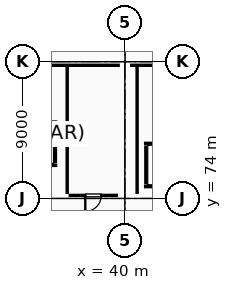
"""IFC4 building model, lengths in metres.
Left out: names, types, materials, properties, quantities, classifications, styles, units other than length and angle.
Written with IfcOpenShell. Run it as: python <this file> out.ifc"""

import sys

from ifc_helpers import new_model, si_unit, direction, frame, frame_2d, origin, origin_2d, place, context, subcontext, project, spatial, rectangle, extrude, element, fill, save


model = new_model("IFC4")
c1 = context("Model", 3, precision=1e-05, world=origin(), true_north=direction((0.0, 1.0)))
c2 = subcontext(c1, "Body", "Model", "MODEL_VIEW")
j1 = project(units=[si_unit("LENGTHUNIT", "METRE"), si_unit("PLANEANGLEUNIT", "RADIAN")], contexts=[c1])
p1 = place(None, origin())
s1 = spatial("IfcSite", under=j1, at=p1, CompositionType="ELEMENT")
p2 = place(p1, origin())
s2 = spatial("IfcBuilding", under=s1, at=p2, CompositionType="ELEMENT")
p3 = place(p2, frame((0.0, 0.0, 5.4)))
s3 = spatial("IfcBuildingStorey", under=s2, at=p3, CompositionType="ELEMENT", Elevation=5.4)
p4 = place(p3, frame((40.0, 74.0, 0.0), z_axis=(0.0, 0.0, 1.0), x_axis=(1.0, 0.0, 0.0)))
e1 = element("IfcColumn", 1, at=p4, inside=s3, PredefinedType="COLUMN", context=c2, shape_type="SweptSolid", body=[
    extrude(rectangle(XDim=0.9, YDim=0.9, at=origin_2d()), origin(), (0.0, 0.0, 1.0), 4.8),
])
p5 = place(p3, frame((40.0, 83.0, 0.0), z_axis=(0.0, 0.0, 1.0), x_axis=(1.0, 0.0, 0.0)))
e2 = element("IfcColumn", 2, at=p5, inside=s3, PredefinedType="COLUMN", context=c2, shape_type="SweptSolid", body=[
    extrude(rectangle(XDim=0.65, YDim=0.65, at=origin_2d()), origin(), (0.0, 0.0, 1.0), 4.8),
])
p6 = place(p3, frame((33.17, 82.76, 0.0), z_axis=(0.0, 0.0, 1.0), x_axis=(1.0, 0.0, 0.0)))
e3 = element("IfcWall", 3, at=p6, inside=s3, PredefinedType="PARAPET", context=c2, shape_type="SweptSolid", body=[
    extrude(rectangle(XDim=6.495, YDim=0.18, at=frame_2d((3.248, 0.0))), origin(), (0.0, 0.0, 1.0), 0.88),
])
p7 = place(p3, frame((40.335, 82.76, 0.0), z_axis=(0.0, 0.0, 1.0), x_axis=(1.0, 0.0, 0.0)))
e4 = element("IfcWall", 4, at=p7, inside=s3, PredefinedType="PARAPET", context=c2, shape_type="SweptSolid", body=[
    extrude(rectangle(XDim=7.33, YDim=0.18, at=frame_2d((3.665, 0.0))), origin(), (0.0, 0.0, 1.0), 0.88),
])
p8 = place(p3, frame((41.25, 74.775, 0.0), z_axis=(0.0, 0.0, 1.0), x_axis=(1.0, 0.0, 0.0)))
e5 = element("IfcWall", 5, at=p8, inside=s3, PredefinedType="STANDARD", context=c2, shape_type="SweptSolid", body=[
    extrude(rectangle(XDim=2.3, YDim=0.25, at=frame_2d((1.15, 0.0))), origin(), (0.0, 0.0, 1.0), 4.53),
])
p9 = place(p8, frame((0.6, 0.0, 0.0)))
e6 = element("IfcOpeningElement", 6, at=p9, cuts=e5, PredefinedType="OPENING", context=c2, shape_type="SweptSolid", body=[
    extrude(rectangle(XDim=1.1, YDim=2.15, at=frame_2d((0.55, 1.075))), frame((0.0, 0.135, 0.0), z_axis=(0.0, -1.0, 0.0), x_axis=(1.0, 0.0, 0.0)), (0.0, 0.0, 1.0), 0.27),
])
p10 = place(p3, frame((43.55, 77.625, 0.0), z_axis=(0.0, 0.0, 1.0), x_axis=(-1.0, 0.0, 0.0)))
e7 = element("IfcWall", 7, at=p10, inside=s3, PredefinedType="STANDARD", context=c2, shape_type="SweptSolid", body=[
    extrude(rectangle(XDim=2.3, YDim=0.25, at=frame_2d((1.15, 0.0))), origin(), (0.0, 0.0, 1.0), 4.53),
])
p11 = place(p3, frame((41.375, 77.49, 0.0), z_axis=(0.0, 0.0, 1.0), x_axis=(0.0, -1.0, 0.0)))
e8 = element("IfcWall", 8, at=p11, inside=s3, PredefinedType="STANDARD", context=c2, shape_type="SweptSolid", body=[
    extrude(rectangle(XDim=2.58, YDim=0.25, at=frame_2d((1.29, 0.0))), origin(), (0.0, 0.0, 1.0), 4.53),
])
p12 = place(p3, frame((33.25, 76.175, 0.0), z_axis=(0.0, 0.0, 1.0), x_axis=(1.0, 0.0, 0.0)))
e9 = element("IfcWall", 9, at=p12, inside=s3, PredefinedType="STANDARD", context=c2, shape_type="SweptSolid", body=[
    extrude(rectangle(XDim=2.3, YDim=0.25, at=frame_2d((1.15, 0.0))), origin(), (0.0, 0.0, 1.0), 4.53),
])
p13 = place(p12, frame((0.6, 0.0, 0.0)))
e10 = element("IfcOpeningElement", 10, at=p13, cuts=e9, PredefinedType="OPENING", context=c2, shape_type="SweptSolid", body=[
    extrude(rectangle(XDim=1.1, YDim=2.15, at=frame_2d((0.55, 1.075))), frame((0.0, 0.135, 0.0), z_axis=(0.0, -1.0, 0.0), x_axis=(1.0, 0.0, 0.0)), (0.0, 0.0, 1.0), 0.27),
])
p14 = place(p3, frame((35.55, 79.025, 0.0), z_axis=(0.0, 0.0, 1.0), x_axis=(-1.0, 0.0, 0.0)))
e11 = element("IfcWall", 11, at=p14, inside=s3, PredefinedType="STANDARD", context=c2, shape_type="SweptSolid", body=[
    extrude(rectangle(XDim=2.3, YDim=0.25, at=frame_2d((1.15, 0.0))), origin(), (0.0, 0.0, 1.0), 4.53),
])
p15 = place(p3, frame((35.425, 76.31, 0.0), z_axis=(0.0, 0.0, 1.0), x_axis=(0.0, 1.0, 0.0)))
e12 = element("IfcWall", 12, at=p15, inside=s3, PredefinedType="STANDARD", context=c2, shape_type="SweptSolid", body=[
    extrude(rectangle(XDim=2.58, YDim=0.25, at=frame_2d((1.29, 0.0))), origin(), (0.0, 0.0, 1.0), 4.53),
])
p16 = place(p3, frame((40.8, 82.666, 0.0), z_axis=(0.0, 0.0, 1.0), x_axis=(0.0, -1.0, 0.0)))
e13 = element("IfcWall", 13, at=p16, inside=s3, PredefinedType="PARTITIONING", context=c2, shape_type="SweptSolid", body=[
    extrude(rectangle(XDim=8.371, YDim=0.15, at=frame_2d((4.186, 0.0))), origin(), (0.0, 0.0, 1.0), 4.53),
])
p17 = place(p3, frame((39.535, 74.2, 0.0), z_axis=(0.0, 0.0, 1.0), x_axis=(-1.0, 0.0, 0.0)))
e14 = element("IfcWall", 14, at=p17, inside=s3, PredefinedType="PARTITIONING", context=c2, shape_type="SweptSolid", body=[
    extrude(rectangle(XDim=3.24, YDim=0.15, at=frame_2d((1.62, 0.0))), origin(), (0.0, 0.0, 1.0), 4.53),
])
p18 = place(p17, frame((1.095, 0.0, 0.0)))
e15 = element("IfcOpeningElement", 15, at=p18, cuts=e14, PredefinedType="OPENING", context=c2, shape_type="SweptSolid", body=[
    extrude(rectangle(XDim=1.05, YDim=2.15, at=frame_2d((0.525, 1.075))), frame((0.0, 0.085, 0.0), z_axis=(0.0, -1.0, 0.0), x_axis=(1.0, 0.0, 0.0)), (0.0, 0.0, 1.0), 0.17),
])
p19 = place(p3, frame((36.2, 74.295, 0.0), z_axis=(0.0, 0.0, 1.0), x_axis=(0.0, 1.0, 0.0)))
e16 = element("IfcWall", 16, at=p19, inside=s3, PredefinedType="PARTITIONING", context=c2, shape_type="SweptSolid", body=[
    extrude(rectangle(XDim=8.371, YDim=0.15, at=frame_2d((4.186, 0.0))), origin(), (0.0, 0.0, 1.0), 4.53),
])
p20 = place(p18, origin())
e17 = element("IfcDoor", 17, at=p20, inside=s3, OperationType="SINGLE_SWING_RIGHT", PredefinedType="DOOR", context=c2, shape_type="SweptSolid", body=[
    extrude(rectangle(XDim=1.05, YDim=2.15, at=frame_2d((0.525, 1.075))), frame((0.0, 0.025, 0.0), z_axis=(0.0, -1.0, 0.0), x_axis=(1.0, 0.0, 0.0)), (0.0, 0.0, 1.0), 0.05),
])
fill(e15, e17)
save(model, sys.argv[1])
